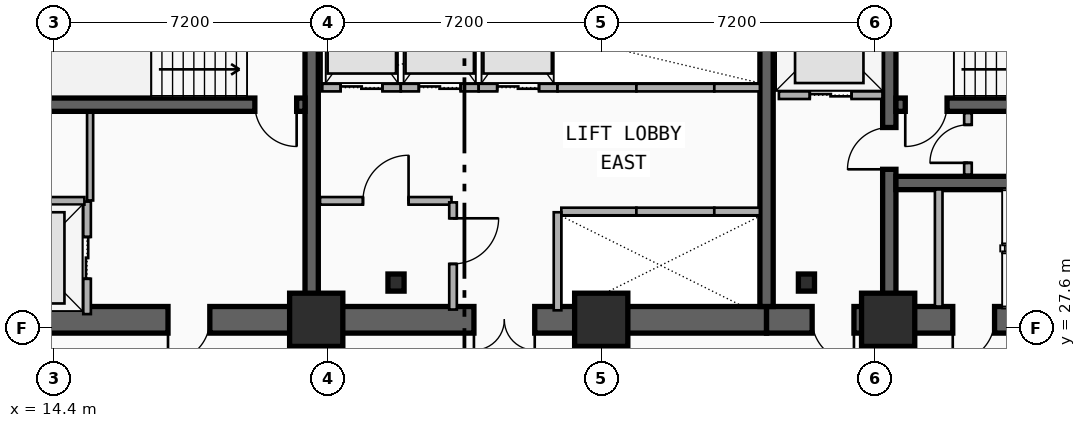
"""IFC4 building model, lengths in metres.
Left out: names, types, materials, properties, quantities, classifications, styles, units other than length and angle.
Written with IfcOpenShell. Run it as: python <this file> out.ifc"""

import sys

from ifc_helpers import new_model, si_unit, direction, frame, frame_2d, origin, origin_2d, place, context, subcontext, project, spatial, rectangle, i_section, extrude, element, fill, save


model = new_model("IFC4")
c1 = context("Model", 3, precision=1e-05, world=origin(), true_north=direction((0.0, 1.0)))
c2 = subcontext(c1, "Body", "Model", "MODEL_VIEW")
j1 = project(units=[si_unit("LENGTHUNIT", "METRE"), si_unit("PLANEANGLEUNIT", "RADIAN")], contexts=[c1])
p1 = place(None, origin())
s1 = spatial("IfcSite", under=j1, at=p1, CompositionType="ELEMENT")
p2 = place(p1, origin())
s2 = spatial("IfcBuilding", under=s1, at=p2, CompositionType="ELEMENT")
p3 = place(p2, frame((0.0, 0.0, 71.0)))
s3 = spatial("IfcBuildingStorey", under=s2, at=p3, CompositionType="ELEMENT", Elevation=71.0)
p4 = place(p3, frame((21.18, 27.82, 0.0), z_axis=(0.0, 0.0, 1.0), x_axis=(-1.0, 0.0, 0.0)))
e1 = element("IfcWall", 1, at=p4, inside=s3, PredefinedType="SHEAR", context=c2, shape_type="SweptSolid", body=[
    extrude(rectangle(XDim=9.03, YDim=0.7, at=frame_2d((4.515, 0.0))), origin(), (0.0, 0.0, 1.0), 3.5),
])
p5 = place(p4, frame((2.68, 0.0, 0.0)))
e2 = element("IfcOpeningElement", 2, at=p5, cuts=e1, PredefinedType="OPENING", context=c2, shape_type="SweptSolid", body=[
    extrude(rectangle(XDim=1.1, YDim=2.15, at=frame_2d((0.55, 1.075))), frame((0.0, 0.36, 0.0), z_axis=(0.0, -1.0, 0.0), x_axis=(1.0, 0.0, 0.0)), (0.0, 0.0, 1.0), 0.72),
])
p6 = place(p3, frame((33.15, 27.82, 0.0), z_axis=(0.0, 0.0, 1.0), x_axis=(-1.0, 0.0, 0.0)))
e3 = element("IfcWall", 3, at=p6, inside=s3, PredefinedType="SHEAR", context=c2, shape_type="SweptSolid", body=[
    extrude(rectangle(XDim=11.97, YDim=0.7, at=frame_2d((5.985, 0.0))), origin(), (0.0, 0.0, 1.0), 3.5),
])
p7 = place(p6, frame((6.1, 0.0, 0.0)))
e4 = element("IfcOpeningElement", 4, at=p7, cuts=e3, PredefinedType="OPENING", context=c2, shape_type="SweptSolid", body=[
    extrude(rectangle(XDim=1.6, YDim=2.2, at=frame_2d((0.8, 1.1))), frame((0.0, 0.36, 0.0), z_axis=(0.0, -1.0, 0.0), x_axis=(1.0, 0.0, 0.0)), (0.0, 0.0, 1.0), 0.72),
])
p8 = place(p3, frame((45.38, 27.82, 0.0), z_axis=(0.0, 0.0, 1.0), x_axis=(-1.0, 0.0, 0.0)))
e5 = element("IfcWall", 5, at=p8, inside=s3, PredefinedType="SHEAR", context=c2, shape_type="SweptSolid", body=[
    extrude(rectangle(XDim=12.23, YDim=0.7, at=frame_2d((6.115, 0.0))), origin(), (0.0, 0.0, 1.0), 3.5),
])
p9 = place(p8, frame((9.93, 0.0, 0.0)))
e6 = element("IfcOpeningElement", 6, at=p9, cuts=e5, PredefinedType="OPENING", context=c2, shape_type="SweptSolid", body=[
    extrude(rectangle(XDim=1.1, YDim=2.15, at=frame_2d((0.55, 1.075))), frame((0.0, 0.36, 0.0), z_axis=(0.0, -1.0, 0.0), x_axis=(1.0, 0.0, 0.0)), (0.0, 0.0, 1.0), 0.72),
])
p10 = place(p8, frame((6.23, 0.0, 0.0)))
e7 = element("IfcOpeningElement", 7, at=p10, cuts=e5, PredefinedType="OPENING", context=c2, shape_type="SweptSolid", body=[
    extrude(rectangle(XDim=1.1, YDim=2.15, at=frame_2d((0.55, 1.075))), frame((0.0, 0.36, 0.0), z_axis=(0.0, -1.0, 0.0), x_axis=(1.0, 0.0, 0.0)), (0.0, 0.0, 1.0), 0.72),
])
for number, where, z_axis, x_axis in (
    (8, (21.18, 28.17, 0.0), (0.0, 0.0, 1.0), (0.0, 1.0, 0.0)),
    (9, (33.15, 28.17, 0.0), (0.0, 0.0, 1.0), (0.0, 1.0, 0.0)),
):
    element("IfcWall", number, at=place(p3, frame(where, z_axis=z_axis, x_axis=x_axis)), inside=s3, PredefinedType="SHEAR", context=c2, shape_type="SweptSolid", body=[
        extrude(rectangle(XDim=8.53, YDim=0.35, at=frame_2d((4.265, 0.0))), origin(), (0.0, 0.0, 1.0), 3.5),
    ])
p11 = place(p3, frame((36.38, 28.17, 0.0), z_axis=(0.0, 0.0, 1.0), x_axis=(0.0, 1.0, 0.0)))
e10 = element("IfcWall", 10, at=p11, inside=s3, PredefinedType="SHEAR", context=c2, shape_type="SweptSolid", body=[
    extrude(rectangle(XDim=8.53, YDim=0.35, at=frame_2d((4.265, 0.0))), origin(), (0.0, 0.0, 1.0), 3.5),
])
p12 = place(p11, frame((3.61, 0.0, 0.0)))
e11 = element("IfcOpeningElement", 11, at=p12, cuts=e10, PredefinedType="OPENING", context=c2, shape_type="SweptSolid", body=[
    extrude(rectangle(XDim=1.1, YDim=2.15, at=frame_2d((0.55, 1.075))), frame((0.0, 0.185, 0.0), z_axis=(0.0, -1.0, 0.0), x_axis=(1.0, 0.0, 0.0)), (0.0, 0.0, 1.0), 0.37),
])
p13 = place(p3, frame((21.005, 33.48, 0.0), z_axis=(0.0, 0.0, 1.0), x_axis=(-1.0, 0.0, 0.0)))
e12 = element("IfcWall", 12, at=p13, inside=s3, PredefinedType="SHEAR", context=c2, shape_type="SweptSolid", body=[
    extrude(rectangle(XDim=8.505, YDim=0.35, at=frame_2d((4.252, 0.0))), origin(), (0.0, 0.0, 1.0), 3.5),
])
p14 = place(p13, frame((0.22, 0.0, 0.0)))
e13 = element("IfcOpeningElement", 13, at=p14, cuts=e12, PredefinedType="OPENING", context=c2, shape_type="SweptSolid", body=[
    extrude(rectangle(XDim=1.1, YDim=2.15, at=frame_2d((0.55, 1.075))), frame((0.0, 0.185, 0.0), z_axis=(0.0, -1.0, 0.0), x_axis=(1.0, 0.0, 0.0)), (0.0, 0.0, 1.0), 0.37),
])
p15 = place(p3, frame((45.03, 33.48, 0.0), z_axis=(0.0, 0.0, 1.0), x_axis=(-1.0, 0.0, 0.0)))
e14 = element("IfcWall", 14, at=p15, inside=s3, PredefinedType="SHEAR", context=c2, shape_type="SweptSolid", body=[
    extrude(rectangle(XDim=8.475, YDim=0.35, at=frame_2d((4.238, 0.0))), origin(), (0.0, 0.0, 1.0), 3.5),
])
p16 = place(p15, frame((7.13, 0.0, 0.0)))
e15 = element("IfcOpeningElement", 15, at=p16, cuts=e14, PredefinedType="OPENING", context=c2, shape_type="SweptSolid", body=[
    extrude(rectangle(XDim=1.1, YDim=2.15, at=frame_2d((0.55, 1.075))), frame((0.0, 0.185, 0.0), z_axis=(0.0, -1.0, 0.0), x_axis=(1.0, 0.0, 0.0)), (0.0, 0.0, 1.0), 0.37),
])
p17 = place(p3, frame((36.555, 31.42, 0.0), z_axis=(0.0, 0.0, 1.0), x_axis=(1.0, 0.0, 0.0)))
e16 = element("IfcWall", 16, at=p17, inside=s3, PredefinedType="SHEAR", context=c2, shape_type="SweptSolid", body=[
    extrude(rectangle(XDim=8.475, YDim=0.35, at=frame_2d((4.238, 0.0))), origin(), (0.0, 0.0, 1.0), 3.5),
])
for number, where, z_axis, x_axis in (
    (17, (23.4, 28.8, 0.0), (0.0, 0.0, 1.0), (1.0, 0.0, 0.0)),
    (18, (34.2, 28.8, 0.0), (0.0, 0.0, 1.0), (1.0, 0.0, 0.0)),
):
    element("IfcColumn", number, at=place(p3, frame(where, z_axis=z_axis, x_axis=x_axis)), inside=s3, PredefinedType="COLUMN", context=c2, shape_type="SweptSolid", body=[
        extrude(i_section(OverallWidth=0.424, OverallDepth=0.45, WebThickness=0.041, FlangeThickness=0.065, FilletRadius=0.015, at=origin_2d()), origin(), (0.0, 0.0, 1.0), 3.5),
    ])
for number, where, z_axis, x_axis in (
    (19, (21.3, 27.82, 0.0), (0.0, 0.0, 1.0), (1.0, 0.0, 0.0)),
    (20, (28.8, 27.82, 0.0), (0.0, 0.0, 1.0), (1.0, 0.0, 0.0)),
    (21, (36.35, 27.82, 0.0), (0.0, 0.0, 1.0), (1.0, 0.0, 0.0)),
):
    element("IfcColumn", number, at=place(p3, frame(where, z_axis=z_axis, x_axis=x_axis)), inside=s3, PredefinedType="COLUMN", context=c2, shape_type="SweptSolid", body=[
        extrude(rectangle(XDim=1.4, YDim=1.4, at=origin_2d()), origin(), (0.0, 0.0, 1.0), 3.5),
    ])
p18 = place(p3, frame((15.27, 27.97, 0.0), z_axis=(0.0, 0.0, 1.0), x_axis=(0.0, 1.0, 0.0)))
e22 = element("IfcWall", 22, at=p18, inside=s3, PredefinedType="PARTITIONING", context=c2, shape_type="SweptSolid", body=[
    extrude(rectangle(XDim=2.96, YDim=0.2, at=frame_2d((1.48, 0.0))), origin(), (0.0, 0.0, 1.0), 2.152),
])
p19 = place(p18, frame((0.93, 0.0, 0.0)))
e23 = element("IfcOpeningElement", 23, at=p19, cuts=e22, PredefinedType="OPENING", context=c2, shape_type="SweptSolid", body=[
    extrude(rectangle(XDim=1.1, YDim=2.15, at=frame_2d((0.55, 1.075))), frame((0.0, 0.11, 0.0), z_axis=(0.0, -1.0, 0.0), x_axis=(1.0, 0.0, 0.0)), (0.0, 0.0, 1.0), 0.22),
])
p20 = place(p3, frame((12.45, 30.95, 0.0), z_axis=(0.0, 0.0, 1.0), x_axis=(1.0, 0.0, 0.0)))
e24 = element("IfcWall", 24, at=p20, inside=s3, PredefinedType="PARTITIONING", context=c2, shape_type="SweptSolid", body=[
    extrude(rectangle(XDim=2.75, YDim=0.2, at=frame_2d((1.375, 0.0))), origin(), (0.0, 0.0, 1.0), 2.152),
])
p21 = place(p3, frame((33.475, 33.73, 0.0), z_axis=(0.0, 0.0, 1.0), x_axis=(1.0, 0.0, 0.0)))
e25 = element("IfcWall", 25, at=p21, inside=s3, PredefinedType="PARTITIONING", context=c2, shape_type="SweptSolid", body=[
    extrude(rectangle(XDim=2.725, YDim=0.2, at=frame_2d((1.362, 0.0))), origin(), (0.0, 0.0, 1.0), 2.152),
])
p22 = place(p21, frame((0.812, 0.0, 0.0)))
e26 = element("IfcOpeningElement", 26, at=p22, cuts=e25, PredefinedType="OPENING", context=c2, shape_type="SweptSolid", body=[
    extrude(rectangle(XDim=1.1, YDim=2.15, at=frame_2d((0.55, 1.075))), frame((0.0, 0.11, 0.0), z_axis=(0.0, -1.0, 0.0), x_axis=(1.0, 0.0, 0.0)), (0.0, 0.0, 1.0), 0.22),
])
p23 = place(p3, frame((27.75, 30.67, 0.0), z_axis=(0.0, 0.0, 1.0), x_axis=(1.0, 0.0, 0.0)))
e27 = element("IfcWall", 27, at=p23, inside=s3, PredefinedType="PARTITIONING", context=c2, shape_type="SweptSolid", body=[
    extrude(rectangle(XDim=1.975, YDim=0.2, at=frame_2d((0.988, 0.0))), origin(), (0.0, 0.0, 1.0), 2.152),
])
p24 = place(p3, frame((27.65, 28.07, 0.0), z_axis=(0.0, 0.0, 1.0), x_axis=(0.0, 1.0, 0.0)))
e28 = element("IfcWall", 28, at=p24, inside=s3, PredefinedType="PARTITIONING", context=c2, shape_type="SweptSolid", body=[
    extrude(rectangle(XDim=2.58, YDim=0.2, at=frame_2d((1.29, 0.0))), origin(), (0.0, 0.0, 1.0), 2.152),
])
p25 = place(p3, frame((29.725, 30.67, 0.0), z_axis=(0.0, 0.0, 1.0), x_axis=(1.0, 0.0, 0.0)))
e29 = element("IfcWall", 29, at=p25, inside=s3, PredefinedType="PARTITIONING", context=c2, shape_type="SweptSolid", body=[
    extrude(rectangle(XDim=2.05, YDim=0.2, at=frame_2d((1.025, 0.0))), origin(), (0.0, 0.0, 1.0), 2.56),
])
p26 = place(p3, frame((31.775, 30.67, 0.0), z_axis=(0.0, 0.0, 1.0), x_axis=(1.0, 0.0, 0.0)))
e30 = element("IfcWall", 30, at=p26, inside=s3, PredefinedType="PARTITIONING", context=c2, shape_type="SweptSolid", body=[
    extrude(rectangle(XDim=1.2, YDim=0.2, at=frame_2d((0.6, 0.0))), origin(), (0.0, 0.0, 1.0), 2.56),
])
p27 = place(p3, frame((21.46, 33.93, 0.0), z_axis=(0.0, 0.0, 1.0), x_axis=(1.0, 0.0, 0.0)))
e31 = element("IfcWall", 31, at=p27, inside=s3, PredefinedType="PARTITIONING", context=c2, shape_type="SweptSolid", body=[
    extrude(rectangle(XDim=2.065, YDim=0.2, at=frame_2d((1.032, 0.0))), origin(), (0.0, 0.0, 1.0), 2.152),
])
p28 = place(p27, frame((0.482, 0.0, 0.0)))
e32 = element("IfcOpeningElement", 32, at=p28, cuts=e31, PredefinedType="OPENING", context=c2, shape_type="SweptSolid", body=[
    extrude(rectangle(XDim=1.1, YDim=2.15, at=frame_2d((0.55, 1.075))), frame((0.0, 0.11, 0.0), z_axis=(0.0, -1.0, 0.0), x_axis=(1.0, 0.0, 0.0)), (0.0, 0.0, 1.0), 0.22),
])
p29 = place(p3, frame((23.525, 33.93, 0.0), z_axis=(0.0, 0.0, 1.0), x_axis=(1.0, 0.0, 0.0)))
e33 = element("IfcWall", 33, at=p29, inside=s3, PredefinedType="PARTITIONING", context=c2, shape_type="SweptSolid", body=[
    extrude(rectangle(XDim=2.05, YDim=0.2, at=frame_2d((1.025, 0.0))), origin(), (0.0, 0.0, 1.0), 3.18),
])
p30 = place(p29, frame((0.475, 0.0, 0.0)))
e34 = element("IfcOpeningElement", 34, at=p30, cuts=e33, PredefinedType="OPENING", context=c2, shape_type="SweptSolid", body=[
    extrude(rectangle(XDim=1.1, YDim=2.15, at=frame_2d((0.55, 1.075))), frame((0.0, 0.11, 0.0), z_axis=(0.0, -1.0, 0.0), x_axis=(1.0, 0.0, 0.0)), (0.0, 0.0, 1.0), 0.22),
])
p31 = place(p3, frame((25.575, 33.93, 0.0), z_axis=(0.0, 0.0, 1.0), x_axis=(1.0, 0.0, 0.0)))
e35 = element("IfcWall", 35, at=p31, inside=s3, PredefinedType="PARTITIONING", context=c2, shape_type="SweptSolid", body=[
    extrude(rectangle(XDim=2.075, YDim=0.2, at=frame_2d((1.038, 0.0))), origin(), (0.0, 0.0, 1.0), 3.18),
])
p32 = place(p31, frame((0.488, 0.0, 0.0)))
e36 = element("IfcOpeningElement", 36, at=p32, cuts=e35, PredefinedType="OPENING", context=c2, shape_type="SweptSolid", body=[
    extrude(rectangle(XDim=1.1, YDim=2.15, at=frame_2d((0.55, 1.075))), frame((0.0, 0.11, 0.0), z_axis=(0.0, -1.0, 0.0), x_axis=(1.0, 0.0, 0.0)), (0.0, 0.0, 1.0), 0.22),
])
p33 = place(p3, frame((27.65, 33.93, 0.0), z_axis=(0.0, 0.0, 1.0), x_axis=(1.0, 0.0, 0.0)))
e37 = element("IfcWall", 37, at=p33, inside=s3, PredefinedType="PARTITIONING", context=c2, shape_type="SweptSolid", body=[
    extrude(rectangle(XDim=2.075, YDim=0.2, at=frame_2d((1.038, 0.0))), origin(), (0.0, 0.0, 1.0), 2.152),
])
p34 = place(p3, frame((29.725, 33.93, 0.0), z_axis=(0.0, 0.0, 1.0), x_axis=(1.0, 0.0, 0.0)))
e38 = element("IfcWall", 38, at=p34, inside=s3, PredefinedType="PARTITIONING", context=c2, shape_type="SweptSolid", body=[
    extrude(rectangle(XDim=2.05, YDim=0.2, at=frame_2d((1.025, 0.0))), origin(), (0.0, 0.0, 1.0), 3.18),
])
p35 = place(p3, frame((31.775, 33.93, 0.0), z_axis=(0.0, 0.0, 1.0), x_axis=(1.0, 0.0, 0.0)))
e39 = element("IfcWall", 39, at=p35, inside=s3, PredefinedType="PARTITIONING", context=c2, shape_type="SweptSolid", body=[
    extrude(rectangle(XDim=1.2, YDim=0.2, at=frame_2d((0.6, 0.0))), origin(), (0.0, 0.0, 1.0), 3.18),
])
p36 = place(p3, frame((37.68, 28.17, 0.0), z_axis=(0.0, 0.0, 1.0), x_axis=(0.0, 1.0, 0.0)))
e40 = element("IfcWall", 40, at=p36, inside=s3, PredefinedType="PARTITIONING", context=c2, shape_type="SweptSolid", body=[
    extrude(rectangle(XDim=3.08, YDim=0.2, at=frame_2d((1.54, 0.0))), origin(), (0.0, 0.0, 1.0), 2.56),
])
p37 = place(p3, frame((38.45, 31.64, 0.0), z_axis=(0.0, 0.0, 1.0), x_axis=(0.0, 1.0, 0.0)))
e41 = element("IfcWall", 41, at=p37, inside=s3, PredefinedType="PARTITIONING", context=c2, shape_type="SweptSolid", body=[
    extrude(rectangle(XDim=1.62, YDim=0.2, at=frame_2d((0.81, 0.0))), origin(), (0.0, 0.0, 1.0), 3.18),
])
p38 = place(p37, frame((0.31, 0.0, 0.0)))
e42 = element("IfcOpeningElement", 42, at=p38, cuts=e41, PredefinedType="OPENING", context=c2, shape_type="SweptSolid", body=[
    extrude(rectangle(XDim=1.0, YDim=2.15, at=frame_2d((0.5, 1.075))), frame((0.0, 0.11, 0.0), z_axis=(0.0, -1.0, 0.0), x_axis=(1.0, 0.0, 0.0)), (0.0, 0.0, 1.0), 0.22),
])
p39 = place(p3, frame((21.4, 30.95, 0.0), z_axis=(0.0, 0.0, 1.0), x_axis=(1.0, 0.0, 0.0)))
e43 = element("IfcWall", 43, at=p39, inside=s3, PredefinedType="PARTITIONING", context=c2, shape_type="SweptSolid", body=[
    extrude(rectangle(XDim=3.46, YDim=0.2, at=frame_2d((1.73, 0.0))), origin(), (0.0, 0.0, 1.0), 2.28),
])
p40 = place(p39, frame((1.13, 0.0, 0.0)))
e44 = element("IfcOpeningElement", 44, at=p40, cuts=e43, PredefinedType="OPENING", context=c2, shape_type="SweptSolid", body=[
    extrude(rectangle(XDim=1.2, YDim=2.15, at=frame_2d((0.6, 1.075))), frame((0.0, 0.11, 0.0), z_axis=(0.0, -1.0, 0.0), x_axis=(1.0, 0.0, 0.0)), (0.0, 0.0, 1.0), 0.22),
])
p41 = place(p3, frame((24.9, 30.91, 0.0), z_axis=(0.0, 0.0, 1.0), x_axis=(0.0, -1.0, 0.0)))
e45 = element("IfcWall", 45, at=p41, inside=s3, PredefinedType="PARTITIONING", context=c2, shape_type="SweptSolid", body=[
    extrude(rectangle(XDim=2.82, YDim=0.2, at=frame_2d((1.41, 0.0))), origin(), (0.0, 0.0, 1.0), 2.56),
])
p42 = place(p41, frame((0.419, 0.0, 0.0)))
e46 = element("IfcOpeningElement", 46, at=p42, cuts=e45, PredefinedType="OPENING", context=c2, shape_type="SweptSolid", body=[
    extrude(rectangle(XDim=1.2, YDim=2.15, at=frame_2d((0.6, 1.075))), frame((0.0, 0.11, 0.0), z_axis=(0.0, -1.0, 0.0), x_axis=(1.0, 0.0, 0.0)), (0.0, 0.0, 1.0), 0.22),
])
p43 = place(p3, frame((15.35, 30.96, 0.0), z_axis=(0.0, 0.0, 1.0), x_axis=(0.0, 1.0, 0.0)))
e47 = element("IfcWall", 47, at=p43, inside=s3, PredefinedType="PARTITIONING", context=c2, shape_type="SweptSolid", body=[
    extrude(rectangle(XDim=2.31, YDim=0.16, at=frame_2d((1.155, 0.0))), origin(), (0.0, 0.0, 1.0), 3.18),
])
p44 = place(p19, origin())
e48 = element("IfcDoor", 48, at=p44, inside=s3, OperationType="DOUBLE_DOOR_SLIDING", PredefinedType="DOOR", context=c2, shape_type="SweptSolid", body=[
    extrude(rectangle(XDim=1.1, YDim=2.15, at=frame_2d((0.55, 1.075))), frame((0.0, 0.025, 0.0), z_axis=(0.0, -1.0, 0.0), x_axis=(1.0, 0.0, 0.0)), (0.0, 0.0, 1.0), 0.05),
])
fill(e23, e48)
p45 = place(p22, origin())
e49 = element("IfcDoor", 49, at=p45, inside=s3, OperationType="DOUBLE_DOOR_SLIDING", PredefinedType="DOOR", context=c2, shape_type="SweptSolid", body=[
    extrude(rectangle(XDim=1.1, YDim=2.15, at=frame_2d((0.55, 1.075))), frame((0.0, 0.025, 0.0), z_axis=(0.0, -1.0, 0.0), x_axis=(1.0, 0.0, 0.0)), (0.0, 0.0, 1.0), 0.05),
])
fill(e26, e49)
p46 = place(p28, origin())
e50 = element("IfcDoor", 50, at=p46, inside=s3, OperationType="DOUBLE_DOOR_SLIDING", PredefinedType="DOOR", context=c2, shape_type="SweptSolid", body=[
    extrude(rectangle(XDim=1.1, YDim=2.15, at=frame_2d((0.55, 1.075))), frame((0.0, 0.025, 0.0), z_axis=(0.0, -1.0, 0.0), x_axis=(1.0, 0.0, 0.0)), (0.0, 0.0, 1.0), 0.05),
])
fill(e32, e50)
p47 = place(p30, origin())
e51 = element("IfcDoor", 51, at=p47, inside=s3, OperationType="DOUBLE_DOOR_SLIDING", PredefinedType="DOOR", context=c2, shape_type="SweptSolid", body=[
    extrude(rectangle(XDim=1.1, YDim=2.15, at=frame_2d((0.55, 1.075))), frame((0.0, 0.025, 0.0), z_axis=(0.0, -1.0, 0.0), x_axis=(1.0, 0.0, 0.0)), (0.0, 0.0, 1.0), 0.05),
])
fill(e34, e51)
p48 = place(p32, origin())
e52 = element("IfcDoor", 52, at=p48, inside=s3, OperationType="DOUBLE_DOOR_SLIDING", PredefinedType="DOOR", context=c2, shape_type="SweptSolid", body=[
    extrude(rectangle(XDim=1.1, YDim=2.15, at=frame_2d((0.55, 1.075))), frame((0.0, 0.025, 0.0), z_axis=(0.0, -1.0, 0.0), x_axis=(1.0, 0.0, 0.0)), (0.0, 0.0, 1.0), 0.05),
])
fill(e36, e52)
p49 = place(p14, origin())
e53 = element("IfcDoor", 53, at=p49, inside=s3, OperationType="SINGLE_SWING_LEFT", PredefinedType="DOOR", context=c2, shape_type="SweptSolid", body=[
    extrude(rectangle(XDim=1.1, YDim=2.15, at=frame_2d((0.55, 1.075))), frame((0.0, 0.025, 0.0), z_axis=(0.0, -1.0, 0.0), x_axis=(1.0, 0.0, 0.0)), (0.0, 0.0, 1.0), 0.05),
])
fill(e13, e53)
p50 = place(p5, origin())
e54 = element("IfcDoor", 54, at=p50, inside=s3, OperationType="SINGLE_SWING_RIGHT", PredefinedType="DOOR", context=c2, shape_type="SweptSolid", body=[
    extrude(rectangle(XDim=1.1, YDim=2.15, at=frame_2d((0.55, 1.075))), frame((0.0, 0.025, 0.0), z_axis=(0.0, -1.0, 0.0), x_axis=(1.0, 0.0, 0.0)), (0.0, 0.0, 1.0), 0.05),
])
fill(e2, e54)
p51 = place(p16, origin())
e55 = element("IfcDoor", 55, at=p51, inside=s3, OperationType="SINGLE_SWING_RIGHT", PredefinedType="DOOR", context=c2, shape_type="SweptSolid", body=[
    extrude(rectangle(XDim=1.1, YDim=2.15, at=frame_2d((0.55, 1.075))), frame((0.0, 0.025, 0.0), z_axis=(0.0, -1.0, 0.0), x_axis=(1.0, 0.0, 0.0)), (0.0, 0.0, 1.0), 0.05),
])
fill(e15, e55)
p52 = place(p12, origin())
e56 = element("IfcDoor", 56, at=p52, inside=s3, OperationType="SINGLE_SWING_LEFT", PredefinedType="DOOR", context=c2, shape_type="SweptSolid", body=[
    extrude(rectangle(XDim=1.1, YDim=2.15, at=frame_2d((0.55, 1.075))), frame((0.0, 0.025, 0.0), z_axis=(0.0, -1.0, 0.0), x_axis=(1.0, 0.0, 0.0)), (0.0, 0.0, 1.0), 0.05),
])
fill(e11, e56)
p53 = place(p9, origin())
e57 = element("IfcDoor", 57, at=p53, inside=s3, OperationType="SINGLE_SWING_LEFT", PredefinedType="DOOR", context=c2, shape_type="SweptSolid", body=[
    extrude(rectangle(XDim=1.1, YDim=2.15, at=frame_2d((0.55, 1.075))), frame((0.0, 0.025, 0.0), z_axis=(0.0, -1.0, 0.0), x_axis=(1.0, 0.0, 0.0)), (0.0, 0.0, 1.0), 0.05),
])
fill(e6, e57)
p54 = place(p10, origin())
e58 = element("IfcDoor", 58, at=p54, inside=s3, OperationType="SINGLE_SWING_RIGHT", PredefinedType="DOOR", context=c2, shape_type="SweptSolid", body=[
    extrude(rectangle(XDim=1.1, YDim=2.15, at=frame_2d((0.55, 1.075))), frame((0.0, 0.025, 0.0), z_axis=(0.0, -1.0, 0.0), x_axis=(1.0, 0.0, 0.0)), (0.0, 0.0, 1.0), 0.05),
])
fill(e7, e58)
p55 = place(p7, origin())
e59 = element("IfcDoor", 59, at=p55, inside=s3, OperationType="SINGLE_SWING_LEFT", PredefinedType="DOOR", context=c2, shape_type="SweptSolid", body=[
    extrude(rectangle(XDim=1.6, YDim=2.2, at=frame_2d((0.8, 1.1))), frame((0.0, 0.025, 0.0), z_axis=(0.0, -1.0, 0.0), x_axis=(1.0, 0.0, 0.0)), (0.0, 0.0, 1.0), 0.05),
])
fill(e4, e59)
p56 = place(p38, origin())
e60 = element("IfcDoor", 60, at=p56, inside=s3, OperationType="SINGLE_SWING_LEFT", PredefinedType="DOOR", context=c2, shape_type="SweptSolid", body=[
    extrude(rectangle(XDim=1.0, YDim=2.15, at=frame_2d((0.5, 1.075))), frame((0.0, 0.025, 0.0), z_axis=(0.0, -1.0, 0.0), x_axis=(1.0, 0.0, 0.0)), (0.0, 0.0, 1.0), 0.05),
])
fill(e42, e60)
p57 = place(p40, origin())
e61 = element("IfcDoor", 61, at=p57, inside=s3, OperationType="SINGLE_SWING_RIGHT", PredefinedType="DOOR", context=c2, shape_type="SweptSolid", body=[
    extrude(rectangle(XDim=1.2, YDim=2.15, at=frame_2d((0.6, 1.075))), frame((0.0, 0.025, 0.0), z_axis=(0.0, -1.0, 0.0), x_axis=(1.0, 0.0, 0.0)), (0.0, 0.0, 1.0), 0.05),
])
fill(e44, e61)
p58 = place(p42, origin())
e62 = element("IfcDoor", 62, at=p58, inside=s3, OperationType="SINGLE_SWING_LEFT", PredefinedType="DOOR", context=c2, shape_type="SweptSolid", body=[
    extrude(rectangle(XDim=1.2, YDim=2.15, at=frame_2d((0.6, 1.075))), frame((0.0, 0.025, 0.0), z_axis=(0.0, -1.0, 0.0), x_axis=(1.0, 0.0, 0.0)), (0.0, 0.0, 1.0), 0.05),
])
fill(e46, e62)
save(model, sys.argv[1])
